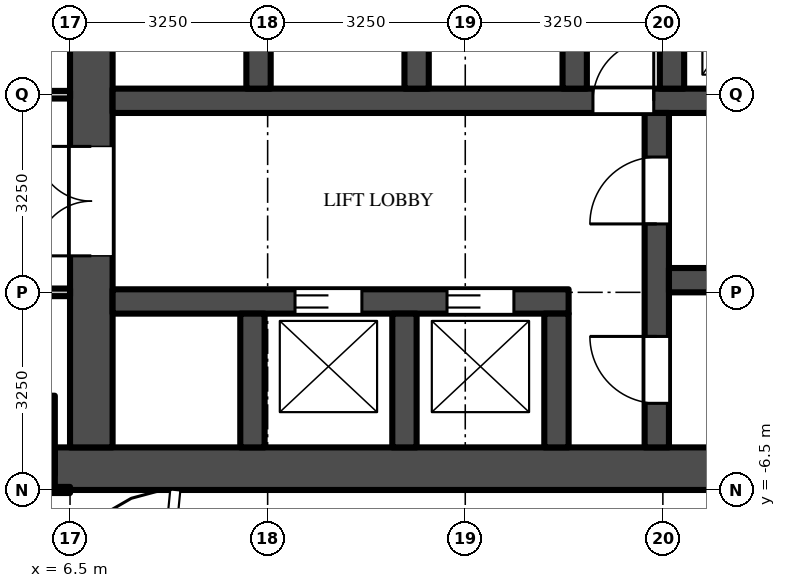
"""IFC4 building model, lengths in metres.
Left out: names, types, materials, properties, quantities, classifications, styles, units other than length and angle.
Written with IfcOpenShell. Run it as: python <this file> out.ifc"""

import sys

from ifc_helpers import new_model, si_unit, direction, frame, frame_2d, origin, origin_2d, place, context, subcontext, project, spatial, rectangle, extrude, source, transform, mapped, element, fill, save


model = new_model("IFC4")
c1 = context("Model", 3, precision=1e-05, world=origin(), true_north=direction((0.0, 1.0)))
c2 = subcontext(c1, "Body", "Model", "MODEL_VIEW")
j1 = project(units=[si_unit("LENGTHUNIT", "METRE"), si_unit("PLANEANGLEUNIT", "RADIAN")], contexts=[c1])
p1 = place(None, origin())
s1 = spatial("IfcSite", under=j1, at=p1, CompositionType="ELEMENT")
p2 = place(p1, origin())
s2 = spatial("IfcBuilding", under=s1, at=p2, CompositionType="ELEMENT")
p3 = place(p2, frame((0.0, 0.0, 102.0)))
s3 = spatial("IfcBuildingStorey", under=s2, at=p3, CompositionType="ELEMENT", Elevation=102.0)
m1 = source(origin(), c2, "Body", "SweptSolid", [
    extrude(rectangle(XDim=1.3, YDim=1.3, at=origin_2d()), origin(), (0.0, 0.0, 1.0), 4.5),
])
p4 = place(p3, frame((5.6, -5.6, 0.0), z_axis=(0.0, 0.0, 1.0), x_axis=(1.0, 0.0, 0.0)))
e1 = element("IfcColumn", 1, at=p4, inside=s3, PredefinedType="COLUMN", context=c2, shape_type="MappedRepresentation", body=[
    mapped(m1, transform((0.0, 0.0, 0.0))),
])
m2 = source(origin(), c2, "Body", "SweptSolid", [
    extrude(rectangle(XDim=16.5, YDim=0.7, at=frame_2d((8.25, 0.0))), origin(), (0.0, 0.0, 1.0), 4.25),
])
p5 = place(p3, frame((6.25, -6.15, 0.0), z_axis=(0.0, 0.0, 1.0), x_axis=(1.0, 0.0, 0.0)))
e2 = element("IfcWall", 2, at=p5, inside=s3, PredefinedType="SHEAR", context=c2, shape_type="MappedRepresentation", body=[
    mapped(m2, transform((0.0, 0.0, 0.0))),
])
m3 = source(origin(), c2, "Body", "SweptSolid", [
    extrude(rectangle(XDim=9.05, YDim=0.7, at=frame_2d((4.525, 0.0))), origin(), (0.0, 0.0, 1.0), 4.25),
])
p6 = place(p3, frame((6.85, -5.8, 0.0), z_axis=(0.0, 0.0, 1.0), x_axis=(0.0, 1.0, 0.0)))
e3 = element("IfcWall", 3, at=p6, inside=s3, PredefinedType="SHEAR", context=c2, shape_type="MappedRepresentation", body=[
    mapped(m3, transform((0.0, 0.0, 0.0))),
])
m4 = source(origin(), c2, "Body", "SweptSolid", [
    extrude(rectangle(XDim=1.8, YDim=2.1, at=frame_2d((0.9, 1.05))), frame((0.0, 0.36, 0.0), z_axis=(0.0, -1.0, 0.0), x_axis=(1.0, 0.0, 0.0)), (0.0, 0.0, 1.0), 0.72),
])
p7 = place(p6, frame((3.15, 0.0, 0.0)))
e4 = element("IfcOpeningElement", 4, at=p7, cuts=e3, PredefinedType="OPENING", context=c2, shape_type="MappedRepresentation", body=[
    mapped(m4, transform((0.0, 0.0, 0.0))),
])
m5 = source(origin(), c2, "Body", "SweptSolid", [
    extrude(rectangle(XDim=7.5, YDim=0.4, at=frame_2d((3.75, 0.0))), origin(), (0.0, 0.0, 1.0), 4.25),
])
p8 = place(p3, frame((7.2, -3.4, 0.0), z_axis=(0.0, 0.0, 1.0), x_axis=(1.0, 0.0, 0.0)))
e5 = element("IfcWall", 5, at=p8, inside=s3, PredefinedType="SHEAR", context=c2, shape_type="MappedRepresentation", body=[
    mapped(m5, transform((0.0, 0.0, 0.0))),
])
m6 = source(origin(), c2, "Body", "SweptSolid", [
    extrude(rectangle(XDim=1.1, YDim=2.1, at=frame_2d((0.55, 1.05))), frame((0.0, 0.21, 0.0), z_axis=(0.0, -1.0, 0.0), x_axis=(1.0, 0.0, 0.0)), (0.0, 0.0, 1.0), 0.42),
])
p9 = place(p8, frame((3.0, 0.0, 0.0)))
e6 = element("IfcOpeningElement", 6, at=p9, cuts=e5, PredefinedType="OPENING", context=c2, shape_type="MappedRepresentation", body=[
    mapped(m6, transform((0.0, 0.0, 0.0))),
])
p10 = place(p8, frame((5.5, 0.0, 0.0)))
e7 = element("IfcOpeningElement", 7, at=p10, cuts=e5, PredefinedType="OPENING", context=c2, shape_type="MappedRepresentation", body=[
    mapped(m6, transform((0.0, 0.0, 0.0))),
])
m7 = source(origin(), c2, "Body", "SweptSolid", [
    extrude(rectangle(XDim=14.85, YDim=0.4, at=frame_2d((7.425, 0.0))), origin(), (0.0, 0.0, 1.0), 4.25),
])
p11 = place(p3, frame((7.2, -0.1, 0.0), z_axis=(0.0, 0.0, 1.0), x_axis=(1.0, 0.0, 0.0)))
e8 = element("IfcWall", 8, at=p11, inside=s3, PredefinedType="SHEAR", context=c2, shape_type="MappedRepresentation", body=[
    mapped(m7, transform((0.0, 0.0, 0.0))),
])
m8 = source(origin(), c2, "Body", "SweptSolid", [
    extrude(rectangle(XDim=1.0, YDim=2.1, at=frame_2d((0.5, 1.05))), frame((0.0, 0.21, 0.0), z_axis=(0.0, -1.0, 0.0), x_axis=(1.0, 0.0, 0.0)), (0.0, 0.0, 1.0), 0.42),
])
p12 = place(p11, frame((7.9, 0.0, 0.0)))
e9 = element("IfcOpeningElement", 9, at=p12, cuts=e8, PredefinedType="OPENING", context=c2, shape_type="MappedRepresentation", body=[
    mapped(m8, transform((0.0, 0.0, 0.0))),
])
m9 = source(origin(), c2, "Body", "SweptSolid", [
    extrude(rectangle(XDim=5.5, YDim=0.4, at=frame_2d((2.75, 0.0))), origin(), (0.0, 0.0, 1.0), 4.25),
])
p13 = place(p3, frame((16.15, -5.8, 0.0), z_axis=(0.0, 0.0, 1.0), x_axis=(0.0, 1.0, 0.0)))
e10 = element("IfcWall", 10, at=p13, inside=s3, PredefinedType="SHEAR", context=c2, shape_type="MappedRepresentation", body=[
    mapped(m9, transform((0.0, 0.0, 0.0))),
])
p14 = place(p13, frame((0.725, 0.0, 0.0)))
e11 = element("IfcOpeningElement", 11, at=p14, cuts=e10, PredefinedType="OPENING", context=c2, shape_type="MappedRepresentation", body=[
    mapped(m6, transform((0.0, 0.0, 0.0))),
])
p15 = place(p13, frame((3.675, 0.0, 0.0)))
e12 = element("IfcOpeningElement", 12, at=p15, cuts=e10, PredefinedType="OPENING", context=c2, shape_type="MappedRepresentation", body=[
    mapped(m6, transform((0.0, 0.0, 0.0))),
])
m10 = source(origin(), c2, "Body", "SweptSolid", [
    extrude(rectangle(XDim=5.7, YDim=0.4, at=frame_2d((2.85, 0.0))), origin(), (0.0, 0.0, 1.0), 4.25),
])
p16 = place(p3, frame((16.35, -3.05, 0.0), z_axis=(0.0, 0.0, 1.0), x_axis=(1.0, 0.0, 0.0)))
e13 = element("IfcWall", 13, at=p16, inside=s3, PredefinedType="SHEAR", context=c2, shape_type="MappedRepresentation", body=[
    mapped(m10, transform((0.0, 0.0, 0.0))),
])
m11 = source(origin(), c2, "Body", "SweptSolid", [
    extrude(rectangle(XDim=2.2, YDim=0.4, at=frame_2d((1.1, 0.0))), origin(), (0.0, 0.0, 1.0), 4.25),
])
for number, where, z_axis, x_axis in (
    (14, (9.5, -5.8, 0.0), (0.0, 0.0, 1.0), (0.0, 1.0, 0.0)),
    (15, (12.0, -5.8, 0.0), (0.0, 0.0, 1.0), (0.0, 1.0, 0.0)),
    (16, (14.5, -5.8, 0.0), (0.0, 0.0, 1.0), (0.0, 1.0, 0.0)),
):
    element("IfcWall", number, at=place(p3, frame(where, z_axis=z_axis, x_axis=x_axis)), inside=s3, PredefinedType="SHEAR", context=c2, shape_type="MappedRepresentation", body=[
        mapped(m11, transform((0.0, 0.0, 0.0))),
    ])
m12 = source(origin(), c2, "Body", "SweptSolid", [
    extrude(rectangle(XDim=2.45, YDim=0.4, at=frame_2d((1.225, 0.0))), origin(), (0.0, 0.0, 1.0), 4.25),
])
for number, where, z_axis, x_axis in (
    (17, (9.6, 0.1, 0.0), (0.0, 0.0, 1.0), (0.0, 1.0, 0.0)),
    (18, (12.2, 0.1, 0.0), (0.0, 0.0, 1.0), (0.0, 1.0, 0.0)),
    (19, (14.8, 0.1, 0.0), (0.0, 0.0, 1.0), (0.0, 1.0, 0.0)),
    (20, (16.4, 0.1, 0.0), (0.0, 0.0, 1.0), (0.0, 1.0, 0.0)),
):
    element("IfcWall", number, at=place(p3, frame(where, z_axis=z_axis, x_axis=x_axis)), inside=s3, PredefinedType="SHEAR", context=c2, shape_type="MappedRepresentation", body=[
        mapped(m12, transform((0.0, 0.0, 0.0))),
    ])
m13 = source(origin(), c2, "Body", "SweptSolid", [
    extrude(rectangle(XDim=5.363, YDim=0.1, at=frame_2d((2.681, 0.0))), origin(), (0.0, 0.0, 1.0), 3.33),
])
p17 = place(p3, frame((1.137, -6.5, 0.0), z_axis=(0.0, 0.0, 1.0), x_axis=(1.0, 0.0, 0.0)))
e21 = element("IfcWall", 21, at=p17, inside=s3, PredefinedType="PARTITIONING", context=c2, shape_type="MappedRepresentation", body=[
    mapped(m13, transform((0.0, 0.0, 0.0))),
])
m14 = source(origin(), c2, "Body", "SweptSolid", [
    extrude(rectangle(XDim=5.363, YDim=0.125, at=frame_2d((2.681, 0.0))), origin(), (0.0, 0.0, 1.0), 3.468),
])
p18 = place(p3, frame((6.5, -3.25, 0.0), z_axis=(0.0, 0.0, 1.0), x_axis=(-1.0, 0.0, 0.0)))
e22 = element("IfcWall", 22, at=p18, inside=s3, PredefinedType="PARTITIONING", context=c2, shape_type="MappedRepresentation", body=[
    mapped(m14, transform((0.0, 0.0, 0.0))),
])
m15 = source(origin(), c2, "Body", "SweptSolid", [
    extrude(rectangle(XDim=1.1, YDim=2.1, at=frame_2d((0.55, 1.05))), frame((0.0, 0.073, 0.0), z_axis=(0.0, -1.0, 0.0), x_axis=(1.0, 0.0, 0.0)), (0.0, 0.0, 1.0), 0.145),
])
p19 = place(p18, frame((0.35, 0.0, 0.0)))
e23 = element("IfcOpeningElement", 23, at=p19, cuts=e22, PredefinedType="OPENING", context=c2, shape_type="MappedRepresentation", body=[
    mapped(m15, transform((0.0, 0.0, 0.0))),
])
p20 = place(p3, frame((6.5, 0.0, 0.0), z_axis=(0.0, 0.0, 1.0), x_axis=(-1.0, 0.0, 0.0)))
e24 = element("IfcWall", 24, at=p20, inside=s3, PredefinedType="PARTITIONING", context=c2, shape_type="MappedRepresentation", body=[
    mapped(m14, transform((0.0, 0.0, 0.0))),
])
m16 = source(origin(), c2, "Body", "SweptSolid", [
    extrude(rectangle(XDim=1.0, YDim=2.1, at=frame_2d((0.5, 1.05))), frame((0.0, 0.073, 0.0), z_axis=(0.0, -1.0, 0.0), x_axis=(1.0, 0.0, 0.0)), (0.0, 0.0, 1.0), 0.145),
])
p21 = place(p20, frame((3.95, 0.0, 0.0)))
e25 = element("IfcOpeningElement", 25, at=p21, cuts=e24, PredefinedType="OPENING", context=c2, shape_type="MappedRepresentation", body=[
    mapped(m16, transform((0.0, 0.0, 0.0))),
])
m17 = source(origin(), c2, "Body", "SweptSolid", [
    extrude(rectangle(XDim=1.1, YDim=2.1, at=frame_2d((0.55, 1.05))), frame((0.0, 0.025, 0.0), z_axis=(0.0, -1.0, 0.0), x_axis=(1.0, 0.0, 0.0)), (0.0, 0.0, 1.0), 0.05),
])
p22 = place(p9, origin())
e26 = element("IfcDoor", 26, at=p22, inside=s3, OperationType="DOUBLE_DOOR_SLIDING", PredefinedType="DOOR", context=c2, shape_type="MappedRepresentation", body=[
    mapped(m17, transform((0.0, 0.0, 0.0))),
])
fill(e6, e26)
p23 = place(p10, origin())
e27 = element("IfcDoor", 27, at=p23, inside=s3, OperationType="DOUBLE_DOOR_SLIDING", PredefinedType="DOOR", context=c2, shape_type="MappedRepresentation", body=[
    mapped(m17, transform((0.0, 0.0, 0.0))),
])
fill(e7, e27)
m18 = source(origin(), c2, "Body", "SweptSolid", [
    extrude(rectangle(XDim=1.8, YDim=2.1, at=frame_2d((0.9, 1.05))), frame((0.0, -0.275, 0.0), z_axis=(0.0, -1.0, 0.0), x_axis=(1.0, 0.0, 0.0)), (0.0, 0.0, 1.0), 0.05),
])
p24 = place(p7, origin())
e28 = element("IfcDoor", 28, at=p24, inside=s3, OperationType="DOUBLE_DOOR_SINGLE_SWING", PredefinedType="DOOR", context=c2, shape_type="MappedRepresentation", body=[
    mapped(m18, transform((0.0, 0.0, 0.0))),
])
fill(e4, e28)
p25 = place(p14, origin())
e29 = element("IfcDoor", 29, at=p25, inside=s3, OperationType="SINGLE_SWING_RIGHT", PredefinedType="DOOR", context=c2, shape_type="MappedRepresentation", body=[
    mapped(m17, transform((0.0, 0.0, 0.0))),
])
fill(e11, e29)
p26 = place(p15, origin())
e30 = element("IfcDoor", 30, at=p26, inside=s3, OperationType="SINGLE_SWING_LEFT", PredefinedType="DOOR", context=c2, shape_type="MappedRepresentation", body=[
    mapped(m17, transform((0.0, 0.0, 0.0))),
])
fill(e12, e30)
m19 = source(origin(), c2, "Body", "SweptSolid", [
    extrude(rectangle(XDim=1.0, YDim=2.1, at=frame_2d((0.5, 1.05))), frame((0.0, 0.025, 0.0), z_axis=(0.0, -1.0, 0.0), x_axis=(1.0, 0.0, 0.0)), (0.0, 0.0, 1.0), 0.05),
])
p27 = place(p12, origin())
e31 = element("IfcDoor", 31, at=p27, inside=s3, OperationType="SINGLE_SWING_RIGHT", PredefinedType="DOOR", context=c2, shape_type="MappedRepresentation", body=[
    mapped(m19, transform((0.0, 0.0, 0.0))),
])
fill(e9, e31)
save(model, sys.argv[1])
